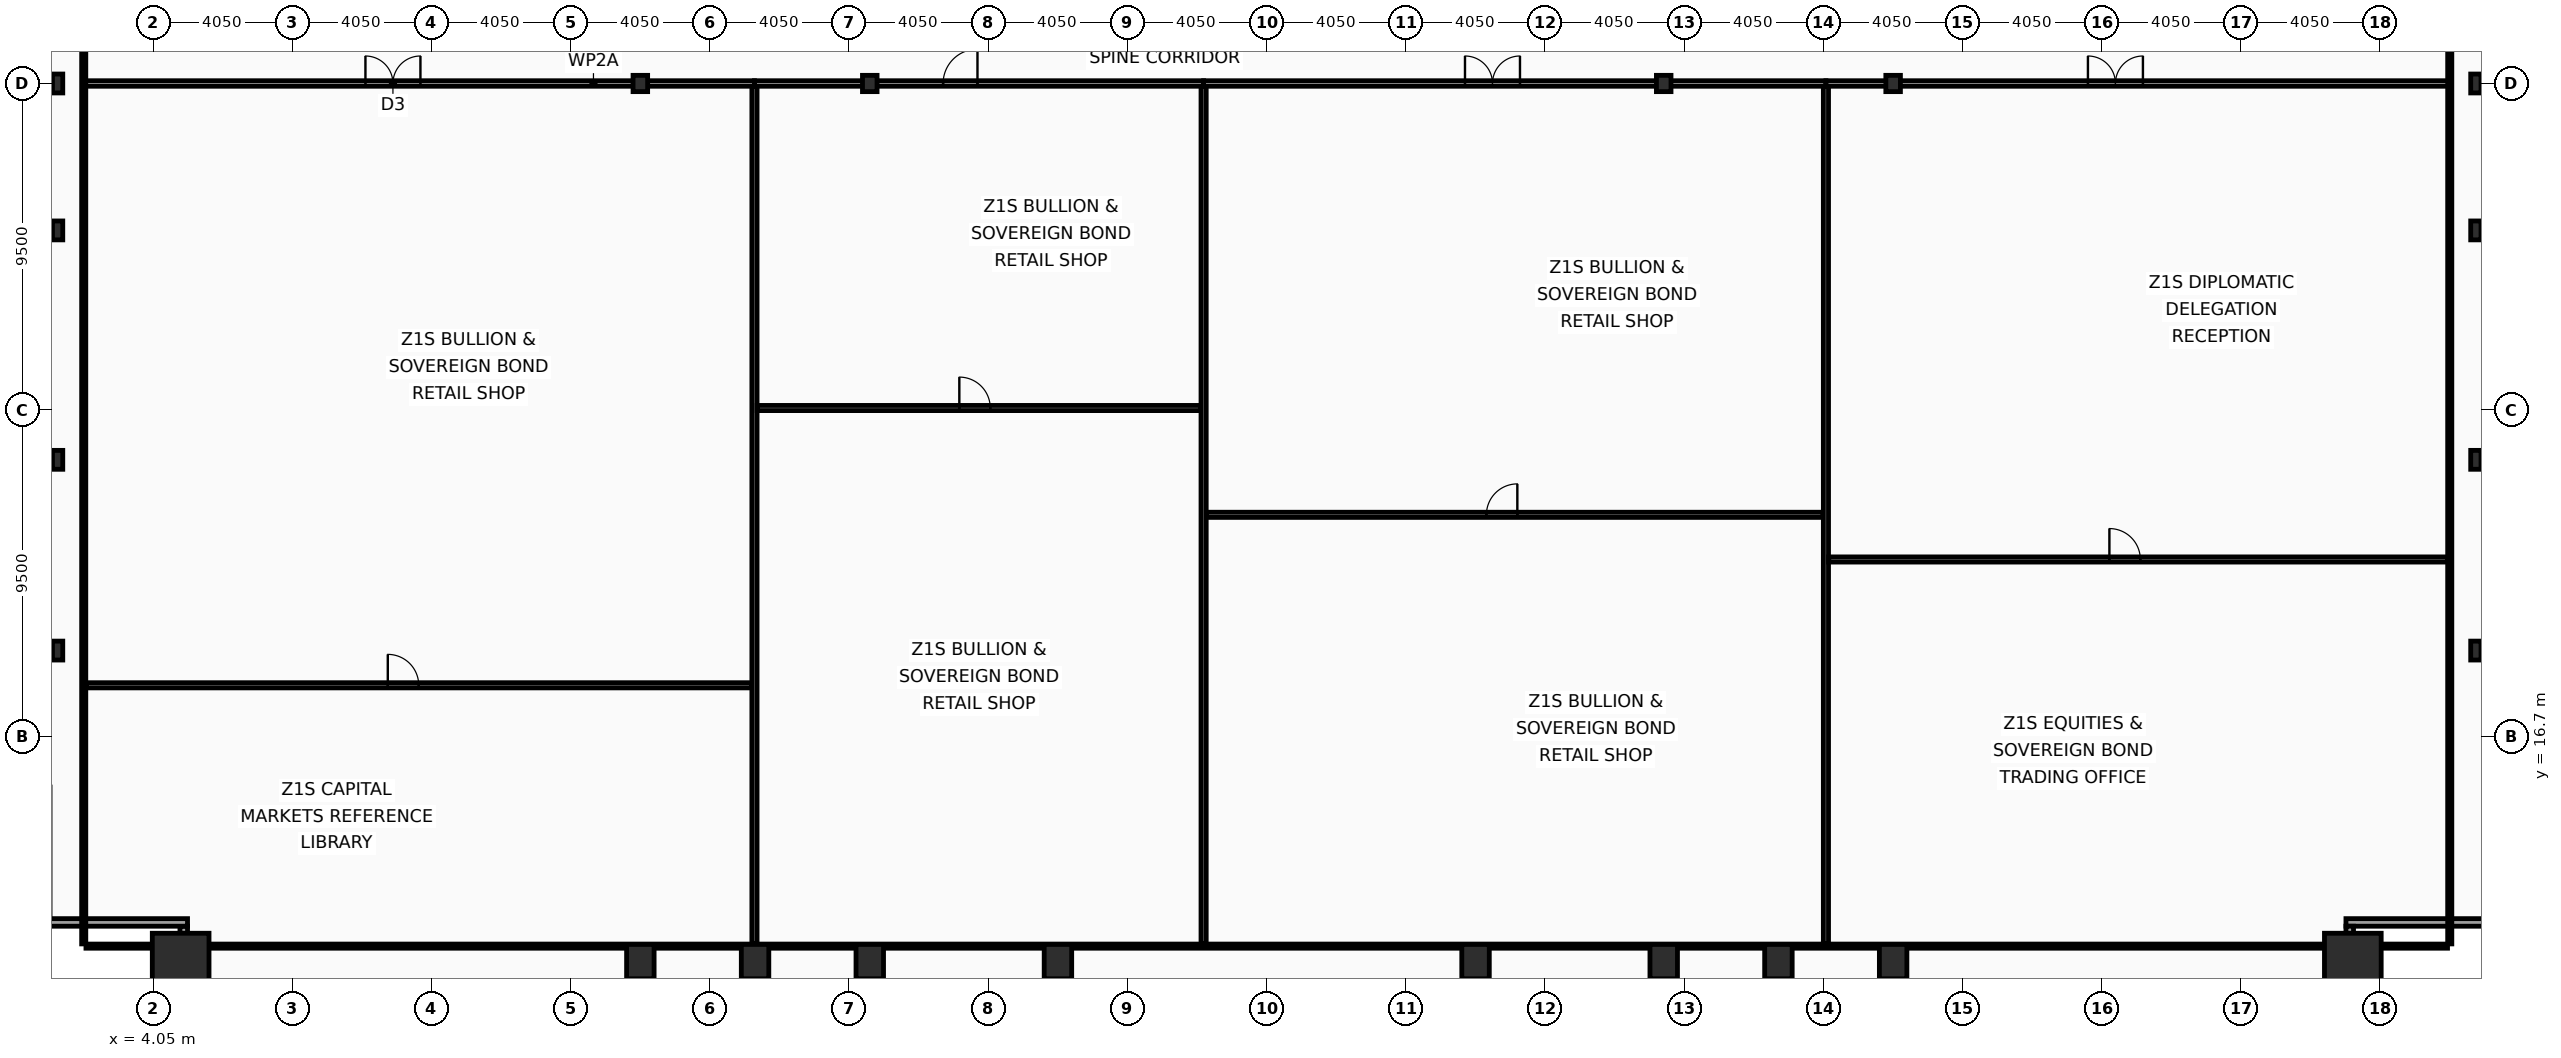
"""IFC4 building model, lengths in metres.
Left out: names, types, materials, properties, quantities, classifications, styles, units other than length and angle.
Written with IfcOpenShell. Run it as: python <this file> out.ifc"""

import sys

from ifc_helpers import new_model, si_unit, direction, frame, frame_2d, origin, origin_2d, place, context, subcontext, project, spatial, rectangle, hollow_rectangle, i_section, extrude, element, fill, save


model = new_model("IFC4")
c1 = context("Model", 3, precision=1e-05, world=origin(), true_north=direction((0.0, 1.0)))
c2 = subcontext(c1, "Body", "Model", "MODEL_VIEW")
j1 = project(units=[si_unit("LENGTHUNIT", "METRE"), si_unit("PLANEANGLEUNIT", "RADIAN")], contexts=[c1])
p1 = place(None, origin())
s1 = spatial("IfcSite", under=j1, at=p1, CompositionType="ELEMENT")
p2 = place(p1, origin())
s2 = spatial("IfcBuilding", under=s1, at=p2, CompositionType="ELEMENT")
p3 = place(p2, frame((0.0, 0.0, 57.8)))
s3 = spatial("IfcBuildingStorey", under=s2, at=p3, CompositionType="ELEMENT", Elevation=57.8)
for number, where, z_axis, x_axis in (
    (1, (4.85, 10.15, 0.0), (0.0, 0.0, 1.0), (1.0, 0.0, 0.0)),
    (2, (68.05, 10.15, 0.0), (0.0, 0.0, 1.0), (1.0, 0.0, 0.0)),
):
    element("IfcColumn", number, at=place(p3, frame(where, z_axis=z_axis, x_axis=x_axis)), inside=s3, PredefinedType="COLUMN", context=c2, shape_type="SweptSolid", body=[
        extrude(hollow_rectangle(XDim=1.65, YDim=1.65, WallThickness=0.075, at=origin_2d()), origin(), (0.0, 0.0, 1.0), 4.0),
    ])
for number, where, z_axis, x_axis in (
    (3, (18.225, 10.15, 0.0), (0.0, 0.0, 1.0), (1.0, 0.0, 0.0)),
    (4, (21.562, 10.15, 0.0), (0.0, 0.0, 1.0), (1.0, 0.0, 0.0)),
    (5, (24.9, 10.15, 0.0), (0.0, 0.0, 1.0), (1.0, 0.0, 0.0)),
    (6, (30.375, 10.15, 0.0), (0.0, 0.0, 1.0), (1.0, 0.0, 0.0)),
    (7, (42.525, 10.15, 0.0), (0.0, 0.0, 1.0), (1.0, 0.0, 0.0)),
    (8, (48.0, 10.15, 0.0), (0.0, 0.0, 1.0), (1.0, 0.0, 0.0)),
    (9, (51.337, 10.15, 0.0), (0.0, 0.0, 1.0), (1.0, 0.0, 0.0)),
    (10, (54.675, 10.15, 0.0), (0.0, 0.0, 1.0), (1.0, 0.0, 0.0)),
):
    element("IfcColumn", number, at=place(p3, frame(where, z_axis=z_axis, x_axis=x_axis)), inside=s3, PredefinedType="COLUMN", context=c2, shape_type="SweptSolid", body=[
        extrude(hollow_rectangle(XDim=0.8, YDim=1.0, WallThickness=0.055, at=origin_2d()), origin(), (0.0, 0.0, 1.0), 4.0),
    ])
for number, where, z_axis, x_axis in (
    (11, (1.27, 19.2, 0.0), (0.0, 0.0, 1.0), (1.0, 0.0, 0.0)),
    (12, (1.27, 24.75, 0.0), (0.0, 0.0, 1.0), (1.0, 0.0, 0.0)),
    (13, (1.27, 31.425, 0.0), (0.0, 0.0, 1.0), (1.0, 0.0, 0.0)),
    (14, (1.27, 35.7, 0.0), (0.0, 0.0, 1.0), (1.0, 0.0, 0.0)),
    (15, (71.63, 19.2, 0.0), (0.0, 0.0, 1.0), (1.0, 0.0, 0.0)),
    (16, (71.63, 24.75, 0.0), (0.0, 0.0, 1.0), (1.0, 0.0, 0.0)),
    (17, (71.63, 31.425, 0.0), (0.0, 0.0, 1.0), (1.0, 0.0, 0.0)),
    (18, (71.63, 35.7, 0.0), (0.0, 0.0, 1.0), (1.0, 0.0, 0.0)),
):
    element("IfcColumn", number, at=place(p3, frame(where, z_axis=z_axis, x_axis=x_axis)), inside=s3, PredefinedType="COLUMN", context=c2, shape_type="SweptSolid", body=[
        extrude(i_section(OverallWidth=0.3, OverallDepth=0.55, WebThickness=0.015, FlangeThickness=0.029, at=origin_2d()), origin(), (0.0, 0.0, 1.0), 4.0),
    ])
for number, where, z_axis, x_axis in (
    (19, (18.225, 35.7, 0.0), (0.0, 0.0, 1.0), (1.0, 0.0, 0.0)),
    (20, (24.9, 35.7, 0.0), (0.0, 0.0, 1.0), (1.0, 0.0, 0.0)),
    (21, (48.0, 35.7, 0.0), (0.0, 0.0, 1.0), (1.0, 0.0, 0.0)),
    (22, (54.675, 35.7, 0.0), (0.0, 0.0, 1.0), (1.0, 0.0, 0.0)),
):
    element("IfcColumn", number, at=place(p3, frame(where, z_axis=z_axis, x_axis=x_axis)), inside=s3, PredefinedType="COLUMN", context=c2, shape_type="SweptSolid", body=[
        extrude(i_section(OverallWidth=0.424, OverallDepth=0.474, WebThickness=0.048, FlangeThickness=0.077, at=origin_2d()), origin(), (0.0, 0.0, 1.0), 4.0),
    ])
p4 = place(p3, frame((4.94, 7.27, 0.0), z_axis=(0.0, 0.0, 1.0), x_axis=(0.0, 1.0, 0.0)))
e23 = element("IfcWall", 23, at=p4, inside=s3, PredefinedType="SOLIDWALL", context=c2, shape_type="SweptSolid", body=[
    extrude(rectangle(XDim=3.91, YDim=0.22, at=frame_2d((1.955, 0.0))), origin(), (0.0, 0.0, 1.0), 3.16),
])
for number, where, z_axis, x_axis in (
    (24, (5.05, 11.29, 0.0), (0.0, 0.0, 1.0), (-1.0, 0.0, 0.0)),
    (25, (72.07, 11.29, 0.0), (0.0, 0.0, 1.0), (-1.0, 0.0, 0.0)),
):
    element("IfcWall", number, at=place(p3, frame(where, z_axis=z_axis, x_axis=x_axis)), inside=s3, PredefinedType="SOLIDWALL", context=c2, shape_type="SweptSolid", body=[
        extrude(rectangle(XDim=4.22, YDim=0.22, at=frame_2d((2.11, 0.0))), origin(), (0.0, 0.0, 1.0), 3.16),
    ])
p5 = place(p3, frame((67.96, 11.18, 0.0), z_axis=(0.0, 0.0, 1.0), x_axis=(0.0, -1.0, 0.0)))
e26 = element("IfcWall", 26, at=p5, inside=s3, PredefinedType="SOLIDWALL", context=c2, shape_type="SweptSolid", body=[
    extrude(rectangle(XDim=3.91, YDim=0.22, at=frame_2d((1.955, 0.0))), origin(), (0.0, 0.0, 1.0), 3.16),
])
p6 = place(p3, frame((2.03, 35.7, 0.0), z_axis=(0.0, 0.0, 1.0), x_axis=(1.0, 0.0, 0.0)))
e27 = element("IfcWall", 27, at=p6, inside=s3, PredefinedType="PARTITIONING", context=c2, shape_type="SweptSolid", body=[
    extrude(rectangle(XDim=19.515, YDim=0.16, at=frame_2d((9.758, 0.0))), origin(), (0.0, 0.0, 1.0), 3.01),
])
p7 = place(p6, frame((8.196, 0.0, 0.0)))
e28 = element("IfcOpeningElement", 28, at=p7, cuts=e27, PredefinedType="OPENING", context=c2, shape_type="SweptSolid", body=[
    extrude(rectangle(XDim=1.6, YDim=2.15, at=frame_2d((0.8, 1.075))), frame((0.0, 0.09, 0.0), z_axis=(0.0, -1.0, 0.0), x_axis=(1.0, 0.0, 0.0)), (0.0, 0.0, 1.0), 0.18),
])
p8 = place(p3, frame((2.095, 18.19, 0.0), z_axis=(0.0, 0.0, 1.0), x_axis=(1.0, 0.0, 0.0)))
e29 = element("IfcWall", 29, at=p8, inside=s3, PredefinedType="PARTITIONING", context=c2, shape_type="SweptSolid", body=[
    extrude(rectangle(XDim=19.37, YDim=0.15, at=frame_2d((9.685, 0.0))), origin(), (0.0, 0.0, 1.0), 3.01),
])
p9 = place(p8, frame((8.782, 0.0, 0.0)))
e30 = element("IfcOpeningElement", 30, at=p9, cuts=e29, PredefinedType="OPENING", context=c2, shape_type="SweptSolid", body=[
    extrude(rectangle(XDim=0.9, YDim=2.05, at=frame_2d((0.45, 1.025))), frame((0.0, 0.085, 0.0), z_axis=(0.0, -1.0, 0.0), x_axis=(1.0, 0.0, 0.0)), (0.0, 0.0, 1.0), 0.17),
])
p10 = place(p3, frame((21.545, 35.7, 0.0), z_axis=(0.0, 0.0, 1.0), x_axis=(1.0, 0.0, 0.0)))
e31 = element("IfcWall", 31, at=p10, inside=s3, PredefinedType="PARTITIONING", context=c2, shape_type="SweptSolid", body=[
    extrude(rectangle(XDim=13.068, YDim=0.16, at=frame_2d((6.534, 0.0))), origin(), (0.0, 0.0, 1.0), 3.01),
])
p11 = place(p10, frame((5.489, 0.0, 0.0)))
e32 = element("IfcOpeningElement", 32, at=p11, cuts=e31, PredefinedType="OPENING", context=c2, shape_type="SweptSolid", body=[
    extrude(rectangle(XDim=1.0, YDim=2.05, at=frame_2d((0.5, 1.025))), frame((0.0, 0.09, 0.0), z_axis=(0.0, -1.0, 0.0), x_axis=(1.0, 0.0, 0.0)), (0.0, 0.0, 1.0), 0.18),
])
p12 = place(p3, frame((21.545, 10.665, 0.0), z_axis=(0.0, 0.0, 1.0), x_axis=(0.0, 1.0, 0.0)))
e33 = element("IfcWall", 33, at=p12, inside=s3, PredefinedType="PARTITIONING", context=c2, shape_type="SweptSolid", body=[
    extrude(rectangle(XDim=24.95, YDim=0.15, at=frame_2d((12.475, 0.0))), origin(), (0.0, 0.0, 1.0), 3.21),
])
p13 = place(p3, frame((21.625, 26.257, 0.0), z_axis=(0.0, 0.0, 1.0), x_axis=(1.0, 0.0, 0.0)))
e34 = element("IfcWall", 34, at=p13, inside=s3, PredefinedType="PARTITIONING", context=c2, shape_type="SweptSolid", body=[
    extrude(rectangle(XDim=12.908, YDim=0.15, at=frame_2d((6.454, 0.0))), origin(), (0.0, 0.0, 1.0), 3.01),
])
p14 = place(p13, frame((5.881, 0.0, 0.0)))
e35 = element("IfcOpeningElement", 35, at=p14, cuts=e34, PredefinedType="OPENING", context=c2, shape_type="SweptSolid", body=[
    extrude(rectangle(XDim=0.9, YDim=2.05, at=frame_2d((0.45, 1.025))), frame((0.0, 0.085, 0.0), z_axis=(0.0, -1.0, 0.0), x_axis=(1.0, 0.0, 0.0)), (0.0, 0.0, 1.0), 0.17),
])
p15 = place(p3, frame((34.613, 35.7, 0.0), z_axis=(0.0, 0.0, 1.0), x_axis=(1.0, 0.0, 0.0)))
e36 = element("IfcWall", 36, at=p15, inside=s3, PredefinedType="PARTITIONING", context=c2, shape_type="SweptSolid", body=[
    extrude(rectangle(XDim=18.106, YDim=0.16, at=frame_2d((9.053, 0.0))), origin(), (0.0, 0.0, 1.0), 3.01),
])
p16 = place(p15, frame((7.605, 0.0, 0.0)))
e37 = element("IfcOpeningElement", 37, at=p16, cuts=e36, PredefinedType="OPENING", context=c2, shape_type="SweptSolid", body=[
    extrude(rectangle(XDim=1.6, YDim=2.15, at=frame_2d((0.8, 1.075))), frame((0.0, 0.09, 0.0), z_axis=(0.0, -1.0, 0.0), x_axis=(1.0, 0.0, 0.0)), (0.0, 0.0, 1.0), 0.18),
])
p17 = place(p3, frame((34.613, 10.665, 0.0), z_axis=(0.0, 0.0, 1.0), x_axis=(0.0, 1.0, 0.0)))
e38 = element("IfcWall", 38, at=p17, inside=s3, PredefinedType="PARTITIONING", context=c2, shape_type="SweptSolid", body=[
    extrude(rectangle(XDim=24.95, YDim=0.15, at=frame_2d((12.475, 0.0))), origin(), (0.0, 0.0, 1.0), 3.21),
])
p18 = place(p3, frame((34.693, 23.15, 0.0), z_axis=(0.0, 0.0, 1.0), x_axis=(1.0, 0.0, 0.0)))
e39 = element("IfcWall", 39, at=p18, inside=s3, PredefinedType="PARTITIONING", context=c2, shape_type="SweptSolid", body=[
    extrude(rectangle(XDim=17.947, YDim=0.15, at=frame_2d((8.973, 0.0))), origin(), (0.0, 0.0, 1.0), 3.01),
])
p19 = place(p18, frame((8.148, 0.0, 0.0)))
e40 = element("IfcOpeningElement", 40, at=p19, cuts=e39, PredefinedType="OPENING", context=c2, shape_type="SweptSolid", body=[
    extrude(rectangle(XDim=0.9, YDim=2.05, at=frame_2d((0.45, 1.025))), frame((0.0, 0.085, 0.0), z_axis=(0.0, -1.0, 0.0), x_axis=(1.0, 0.0, 0.0)), (0.0, 0.0, 1.0), 0.17),
])
p20 = place(p3, frame((52.72, 35.7, 0.0), z_axis=(0.0, 0.0, 1.0), x_axis=(1.0, 0.0, 0.0)))
e41 = element("IfcWall", 41, at=p20, inside=s3, PredefinedType="PARTITIONING", context=c2, shape_type="SweptSolid", body=[
    extrude(rectangle(XDim=18.15, YDim=0.16, at=frame_2d((9.075, 0.0))), origin(), (0.0, 0.0, 1.0), 3.01),
])
p21 = place(p20, frame((7.623, 0.0, 0.0)))
e42 = element("IfcOpeningElement", 42, at=p21, cuts=e41, PredefinedType="OPENING", context=c2, shape_type="SweptSolid", body=[
    extrude(rectangle(XDim=1.6, YDim=2.15, at=frame_2d((0.8, 1.075))), frame((0.0, 0.09, 0.0), z_axis=(0.0, -1.0, 0.0), x_axis=(1.0, 0.0, 0.0)), (0.0, 0.0, 1.0), 0.18),
])
p22 = place(p3, frame((52.72, 10.665, 0.0), z_axis=(0.0, 0.0, 1.0), x_axis=(0.0, 1.0, 0.0)))
e43 = element("IfcWall", 43, at=p22, inside=s3, PredefinedType="PARTITIONING", context=c2, shape_type="SweptSolid", body=[
    extrude(rectangle(XDim=24.95, YDim=0.15, at=frame_2d((12.475, 0.0))), origin(), (0.0, 0.0, 1.0), 3.21),
])
p23 = place(p3, frame((52.8, 21.85, 0.0), z_axis=(0.0, 0.0, 1.0), x_axis=(1.0, 0.0, 0.0)))
e44 = element("IfcWall", 44, at=p23, inside=s3, PredefinedType="PARTITIONING", context=c2, shape_type="SweptSolid", body=[
    extrude(rectangle(XDim=18.005, YDim=0.15, at=frame_2d((9.002, 0.0))), origin(), (0.0, 0.0, 1.0), 3.01),
])
p24 = place(p23, frame((8.167, 0.0, 0.0)))
e45 = element("IfcOpeningElement", 45, at=p24, cuts=e44, PredefinedType="OPENING", context=c2, shape_type="SweptSolid", body=[
    extrude(rectangle(XDim=0.9, YDim=2.05, at=frame_2d((0.45, 1.025))), frame((0.0, 0.085, 0.0), z_axis=(0.0, -1.0, 0.0), x_axis=(1.0, 0.0, 0.0)), (0.0, 0.0, 1.0), 0.17),
])
for number, where, z_axis, x_axis in (
    (46, (2.03, 10.665, 0.0), (0.0, 0.0, 1.0), (0.0, 1.0, 0.0)),
    (47, (70.87, 10.665, 0.0), (0.0, 0.0, 1.0), (0.0, 1.0, 0.0)),
):
    element("IfcWall", number, at=place(p3, frame(where, z_axis=z_axis, x_axis=x_axis)), inside=s3, PredefinedType="PARTITIONING", context=c2, shape_type="SweptSolid", body=[
        extrude(rectangle(XDim=42.11, YDim=0.12, at=frame_2d((21.055, 0.0))), origin(), (0.0, 0.0, 1.0), 3.01),
    ])
p25 = place(p3, frame((2.095, 10.6, 0.0), z_axis=(0.0, 0.0, 1.0), x_axis=(1.0, 0.0, 0.0)))
e48 = element("IfcWall", 48, at=p25, inside=s3, PredefinedType="PARTITIONING", context=c2, shape_type="SweptSolid", body=[
    extrude(rectangle(XDim=68.71, YDim=0.12, at=frame_2d((34.355, 0.0))), origin(), (0.0, 0.0, 1.0), 3.01),
])
p26 = place(p7, origin())
e49 = element("IfcDoor", 49, at=p26, inside=s3, OperationType="DOUBLE_DOOR_SINGLE_SWING", PredefinedType="DOOR", context=c2, shape_type="SweptSolid", body=[
    extrude(rectangle(XDim=1.6, YDim=2.15, at=frame_2d((0.8, 1.075))), frame((0.0, 0.025, 0.0), z_axis=(0.0, -1.0, 0.0), x_axis=(1.0, 0.0, 0.0)), (0.0, 0.0, 1.0), 0.05),
])
fill(e28, e49)
p27 = place(p9, origin())
e50 = element("IfcDoor", 50, at=p27, inside=s3, OperationType="SINGLE_SWING_LEFT", PredefinedType="DOOR", context=c2, shape_type="SweptSolid", body=[
    extrude(rectangle(XDim=0.9, YDim=2.05, at=frame_2d((0.45, 1.025))), frame((0.0, 0.025, 0.0), z_axis=(0.0, -1.0, 0.0), x_axis=(1.0, 0.0, 0.0)), (0.0, 0.0, 1.0), 0.05),
])
fill(e30, e50)
p28 = place(p11, origin())
e51 = element("IfcDoor", 51, at=p28, inside=s3, OperationType="SINGLE_SWING_RIGHT", PredefinedType="DOOR", context=c2, shape_type="SweptSolid", body=[
    extrude(rectangle(XDim=1.0, YDim=2.05, at=frame_2d((0.5, 1.025))), frame((0.0, 0.025, 0.0), z_axis=(0.0, -1.0, 0.0), x_axis=(1.0, 0.0, 0.0)), (0.0, 0.0, 1.0), 0.05),
])
fill(e32, e51)
p29 = place(p14, origin())
e52 = element("IfcDoor", 52, at=p29, inside=s3, OperationType="SINGLE_SWING_LEFT", PredefinedType="DOOR", context=c2, shape_type="SweptSolid", body=[
    extrude(rectangle(XDim=0.9, YDim=2.05, at=frame_2d((0.45, 1.025))), frame((0.0, 0.025, 0.0), z_axis=(0.0, -1.0, 0.0), x_axis=(1.0, 0.0, 0.0)), (0.0, 0.0, 1.0), 0.05),
])
fill(e35, e52)
p30 = place(p16, origin())
e53 = element("IfcDoor", 53, at=p30, inside=s3, OperationType="DOUBLE_DOOR_SINGLE_SWING", PredefinedType="DOOR", context=c2, shape_type="SweptSolid", body=[
    extrude(rectangle(XDim=1.6, YDim=2.15, at=frame_2d((0.8, 1.075))), frame((0.0, 0.025, 0.0), z_axis=(0.0, -1.0, 0.0), x_axis=(1.0, 0.0, 0.0)), (0.0, 0.0, 1.0), 0.05),
])
fill(e37, e53)
p31 = place(p19, origin())
e54 = element("IfcDoor", 54, at=p31, inside=s3, OperationType="SINGLE_SWING_RIGHT", PredefinedType="DOOR", context=c2, shape_type="SweptSolid", body=[
    extrude(rectangle(XDim=0.9, YDim=2.05, at=frame_2d((0.45, 1.025))), frame((0.0, 0.025, 0.0), z_axis=(0.0, -1.0, 0.0), x_axis=(1.0, 0.0, 0.0)), (0.0, 0.0, 1.0), 0.05),
])
fill(e40, e54)
p32 = place(p21, origin())
e55 = element("IfcDoor", 55, at=p32, inside=s3, OperationType="DOUBLE_DOOR_SINGLE_SWING", PredefinedType="DOOR", context=c2, shape_type="SweptSolid", body=[
    extrude(rectangle(XDim=1.6, YDim=2.15, at=frame_2d((0.8, 1.075))), frame((0.0, 0.025, 0.0), z_axis=(0.0, -1.0, 0.0), x_axis=(1.0, 0.0, 0.0)), (0.0, 0.0, 1.0), 0.05),
])
fill(e42, e55)
p33 = place(p24, origin())
e56 = element("IfcDoor", 56, at=p33, inside=s3, OperationType="SINGLE_SWING_LEFT", PredefinedType="DOOR", context=c2, shape_type="SweptSolid", body=[
    extrude(rectangle(XDim=0.9, YDim=2.05, at=frame_2d((0.45, 1.025))), frame((0.0, 0.025, 0.0), z_axis=(0.0, -1.0, 0.0), x_axis=(1.0, 0.0, 0.0)), (0.0, 0.0, 1.0), 0.05),
])
fill(e45, e56)
save(model, sys.argv[1])
